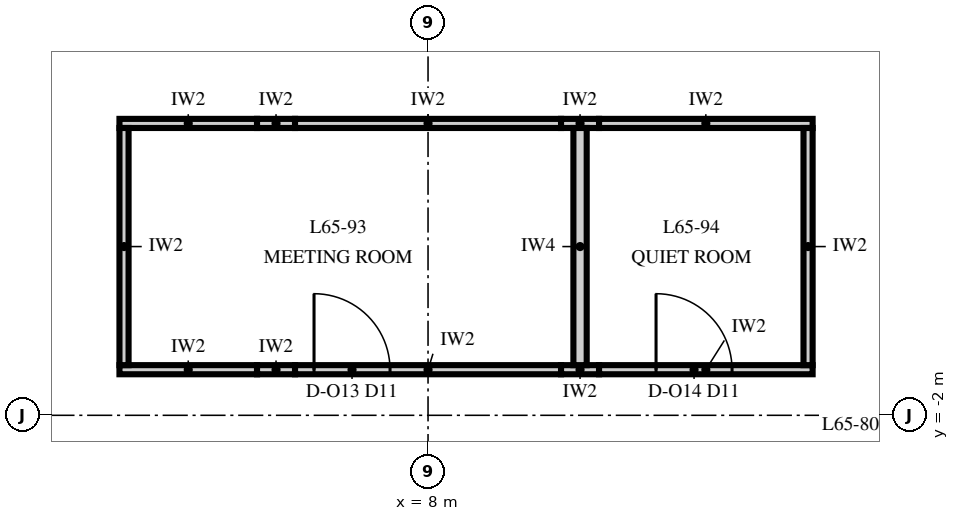
"""IFC4 building model, lengths in metres.
Left out: names, types, materials, properties, quantities, classifications, styles, units other than length and angle.
Written with IfcOpenShell. Run it as: python <this file> out.ifc"""

import sys

from ifc_helpers import new_model, si_unit, direction, frame, frame_2d, origin, place, context, subcontext, project, spatial, rectangle, extrude, element, fill, save


model = new_model("IFC4")
c1 = context("Model", 3, precision=1e-05, world=origin(), true_north=direction((0.0, 1.0)))
c2 = subcontext(c1, "Body", "Model", "MODEL_VIEW")
j1 = project(units=[si_unit("LENGTHUNIT", "METRE"), si_unit("PLANEANGLEUNIT", "RADIAN")], contexts=[c1])
p1 = place(None, origin())
s1 = spatial("IfcSite", under=j1, at=p1, CompositionType="ELEMENT")
p2 = place(p1, origin())
s2 = spatial("IfcBuilding", under=s1, at=p2, CompositionType="ELEMENT")
p3 = place(p2, frame((0.0, 0.0, 280.0)))
s3 = spatial("IfcBuildingStorey", under=s2, at=p3, CompositionType="ELEMENT", Elevation=280.0)
p4 = place(p3, frame((3.94, -1.4, 0.0), z_axis=(0.0, 0.0, 1.0), x_axis=(1.0, 0.0, 0.0)))
e1 = element("IfcWall", 1, at=p4, inside=s3, PredefinedType="PARTITIONING", context=c2, shape_type="SweptSolid", body=[
    extrude(rectangle(XDim=1.81, YDim=0.12, at=frame_2d((0.905, 0.0))), origin(), (0.0, 0.0, 1.0), 3.85),
])
p5 = place(p3, frame((5.75, -1.4, 0.0), z_axis=(0.0, 0.0, 1.0), x_axis=(1.0, 0.0, 0.0)))
e2 = element("IfcWall", 2, at=p5, inside=s3, PredefinedType="PARTITIONING", context=c2, shape_type="SweptSolid", body=[
    extrude(rectangle(XDim=0.5, YDim=0.12, at=frame_2d((0.25, 0.0))), origin(), (0.0, 0.0, 1.0), 2.25),
])
p6 = place(p3, frame((6.25, -1.4, 0.0), z_axis=(0.0, 0.0, 1.0), x_axis=(1.0, 0.0, 0.0)))
e3 = element("IfcWall", 3, at=p6, inside=s3, PredefinedType="PARTITIONING", context=c2, shape_type="SweptSolid", body=[
    extrude(rectangle(XDim=3.5, YDim=0.12, at=frame_2d((1.75, 0.0))), origin(), (0.0, 0.0, 1.0), 3.85),
])
p7 = place(p6, frame((0.25, 0.0, 0.0)))
e4 = element("IfcOpeningElement", 4, at=p7, cuts=e3, PredefinedType="OPENING", context=c2, shape_type="SweptSolid", body=[
    extrude(rectangle(XDim=1.0, YDim=2.4, at=frame_2d((0.5, 1.2))), frame((0.0, 0.075, 0.0), z_axis=(0.0, -1.0, 0.0), x_axis=(1.0, 0.0, 0.0)), (0.0, 0.0, 1.0), 0.15),
])
p8 = place(p3, frame((9.75, -1.4, 0.0), z_axis=(0.0, 0.0, 1.0), x_axis=(1.0, 0.0, 0.0)))
e5 = element("IfcWall", 5, at=p8, inside=s3, PredefinedType="PARTITIONING", context=c2, shape_type="SweptSolid", body=[
    extrude(rectangle(XDim=0.5, YDim=0.12, at=frame_2d((0.25, 0.0))), origin(), (0.0, 0.0, 1.0), 2.25),
])
p9 = place(p3, frame((10.25, -1.4, 0.0), z_axis=(0.0, 0.0, 1.0), x_axis=(1.0, 0.0, 0.0)))
e6 = element("IfcWall", 6, at=p9, inside=s3, PredefinedType="PARTITIONING", context=c2, shape_type="SweptSolid", body=[
    extrude(rectangle(XDim=2.81, YDim=0.12, at=frame_2d((1.405, 0.0))), origin(), (0.0, 0.0, 1.0), 3.85),
])
p10 = place(p9, frame((0.75, 0.0, 0.0)))
e7 = element("IfcOpeningElement", 7, at=p10, cuts=e6, PredefinedType="OPENING", context=c2, shape_type="SweptSolid", body=[
    extrude(rectangle(XDim=1.0, YDim=2.4, at=frame_2d((0.5, 1.2))), frame((0.0, 0.075, 0.0), z_axis=(0.0, -1.0, 0.0), x_axis=(1.0, 0.0, 0.0)), (0.0, 0.0, 1.0), 0.15),
])
p11 = place(p3, frame((3.94, 1.84, 0.0), z_axis=(0.0, 0.0, 1.0), x_axis=(1.0, 0.0, 0.0)))
e8 = element("IfcWall", 8, at=p11, inside=s3, PredefinedType="PARTITIONING", context=c2, shape_type="SweptSolid", body=[
    extrude(rectangle(XDim=1.81, YDim=0.12, at=frame_2d((0.905, 0.0))), origin(), (0.0, 0.0, 1.0), 3.85),
])
p12 = place(p3, frame((5.75, 1.84, 0.0), z_axis=(0.0, 0.0, 1.0), x_axis=(1.0, 0.0, 0.0)))
e9 = element("IfcWall", 9, at=p12, inside=s3, PredefinedType="PARTITIONING", context=c2, shape_type="SweptSolid", body=[
    extrude(rectangle(XDim=0.5, YDim=0.12, at=frame_2d((0.25, 0.0))), origin(), (0.0, 0.0, 1.0), 2.25),
])
p13 = place(p3, frame((6.25, 1.84, 0.0), z_axis=(0.0, 0.0, 1.0), x_axis=(1.0, 0.0, 0.0)))
e10 = element("IfcWall", 10, at=p13, inside=s3, PredefinedType="PARTITIONING", context=c2, shape_type="SweptSolid", body=[
    extrude(rectangle(XDim=3.5, YDim=0.12, at=frame_2d((1.75, 0.0))), origin(), (0.0, 0.0, 1.0), 3.85),
])
p14 = place(p3, frame((9.75, 1.84, 0.0), z_axis=(0.0, 0.0, 1.0), x_axis=(1.0, 0.0, 0.0)))
e11 = element("IfcWall", 11, at=p14, inside=s3, PredefinedType="PARTITIONING", context=c2, shape_type="SweptSolid", body=[
    extrude(rectangle(XDim=0.5, YDim=0.12, at=frame_2d((0.25, 0.0))), origin(), (0.0, 0.0, 1.0), 2.25),
])
p15 = place(p3, frame((10.25, 1.84, 0.0), z_axis=(0.0, 0.0, 1.0), x_axis=(1.0, 0.0, 0.0)))
e12 = element("IfcWall", 12, at=p15, inside=s3, PredefinedType="PARTITIONING", context=c2, shape_type="SweptSolid", body=[
    extrude(rectangle(XDim=2.81, YDim=0.12, at=frame_2d((1.405, 0.0))), origin(), (0.0, 0.0, 1.0), 3.85),
])
p16 = place(p3, frame((4.0, -1.34, 0.0), z_axis=(0.0, 0.0, 1.0), x_axis=(0.0, 1.0, 0.0)))
e13 = element("IfcWall", 13, at=p16, inside=s3, PredefinedType="PARTITIONING", context=c2, shape_type="SweptSolid", body=[
    extrude(rectangle(XDim=3.12, YDim=0.12, at=frame_2d((1.56, 0.0))), origin(), (0.0, 0.0, 1.0), 3.85),
])
p17 = place(p3, frame((10.0, -1.34, 0.0), z_axis=(0.0, 0.0, 1.0), x_axis=(0.0, 1.0, 0.0)))
e14 = element("IfcWall", 14, at=p17, inside=s3, PredefinedType="PARTITIONING", context=c2, shape_type="SweptSolid", body=[
    extrude(rectangle(XDim=3.12, YDim=0.175, at=frame_2d((1.56, 0.0))), origin(), (0.0, 0.0, 1.0), 2.25),
])
p18 = place(p3, frame((13.0, -1.34, 0.0), z_axis=(0.0, 0.0, 1.0), x_axis=(0.0, 1.0, 0.0)))
e15 = element("IfcWall", 15, at=p18, inside=s3, PredefinedType="PARTITIONING", context=c2, shape_type="SweptSolid", body=[
    extrude(rectangle(XDim=3.12, YDim=0.12, at=frame_2d((1.56, 0.0))), origin(), (0.0, 0.0, 1.0), 3.85),
])
p19 = place(p7, origin())
e16 = element("IfcDoor", 16, at=p19, inside=s3, OperationType="SINGLE_SWING_RIGHT", PredefinedType="DOOR", context=c2, shape_type="SweptSolid", body=[
    extrude(rectangle(XDim=1.0, YDim=2.4, at=frame_2d((0.5, 1.2))), frame((0.0, 0.06, 0.0), z_axis=(0.0, -1.0, 0.0), x_axis=(1.0, 0.0, 0.0)), (0.0, 0.0, 1.0), 0.12),
])
fill(e4, e16)
p20 = place(p10, origin())
e17 = element("IfcDoor", 17, at=p20, inside=s3, OperationType="SINGLE_SWING_RIGHT", PredefinedType="DOOR", context=c2, shape_type="SweptSolid", body=[
    extrude(rectangle(XDim=1.0, YDim=2.4, at=frame_2d((0.5, 1.2))), frame((0.0, 0.06, 0.0), z_axis=(0.0, -1.0, 0.0), x_axis=(1.0, 0.0, 0.0)), (0.0, 0.0, 1.0), 0.12),
])
fill(e7, e17)
save(model, sys.argv[1])
